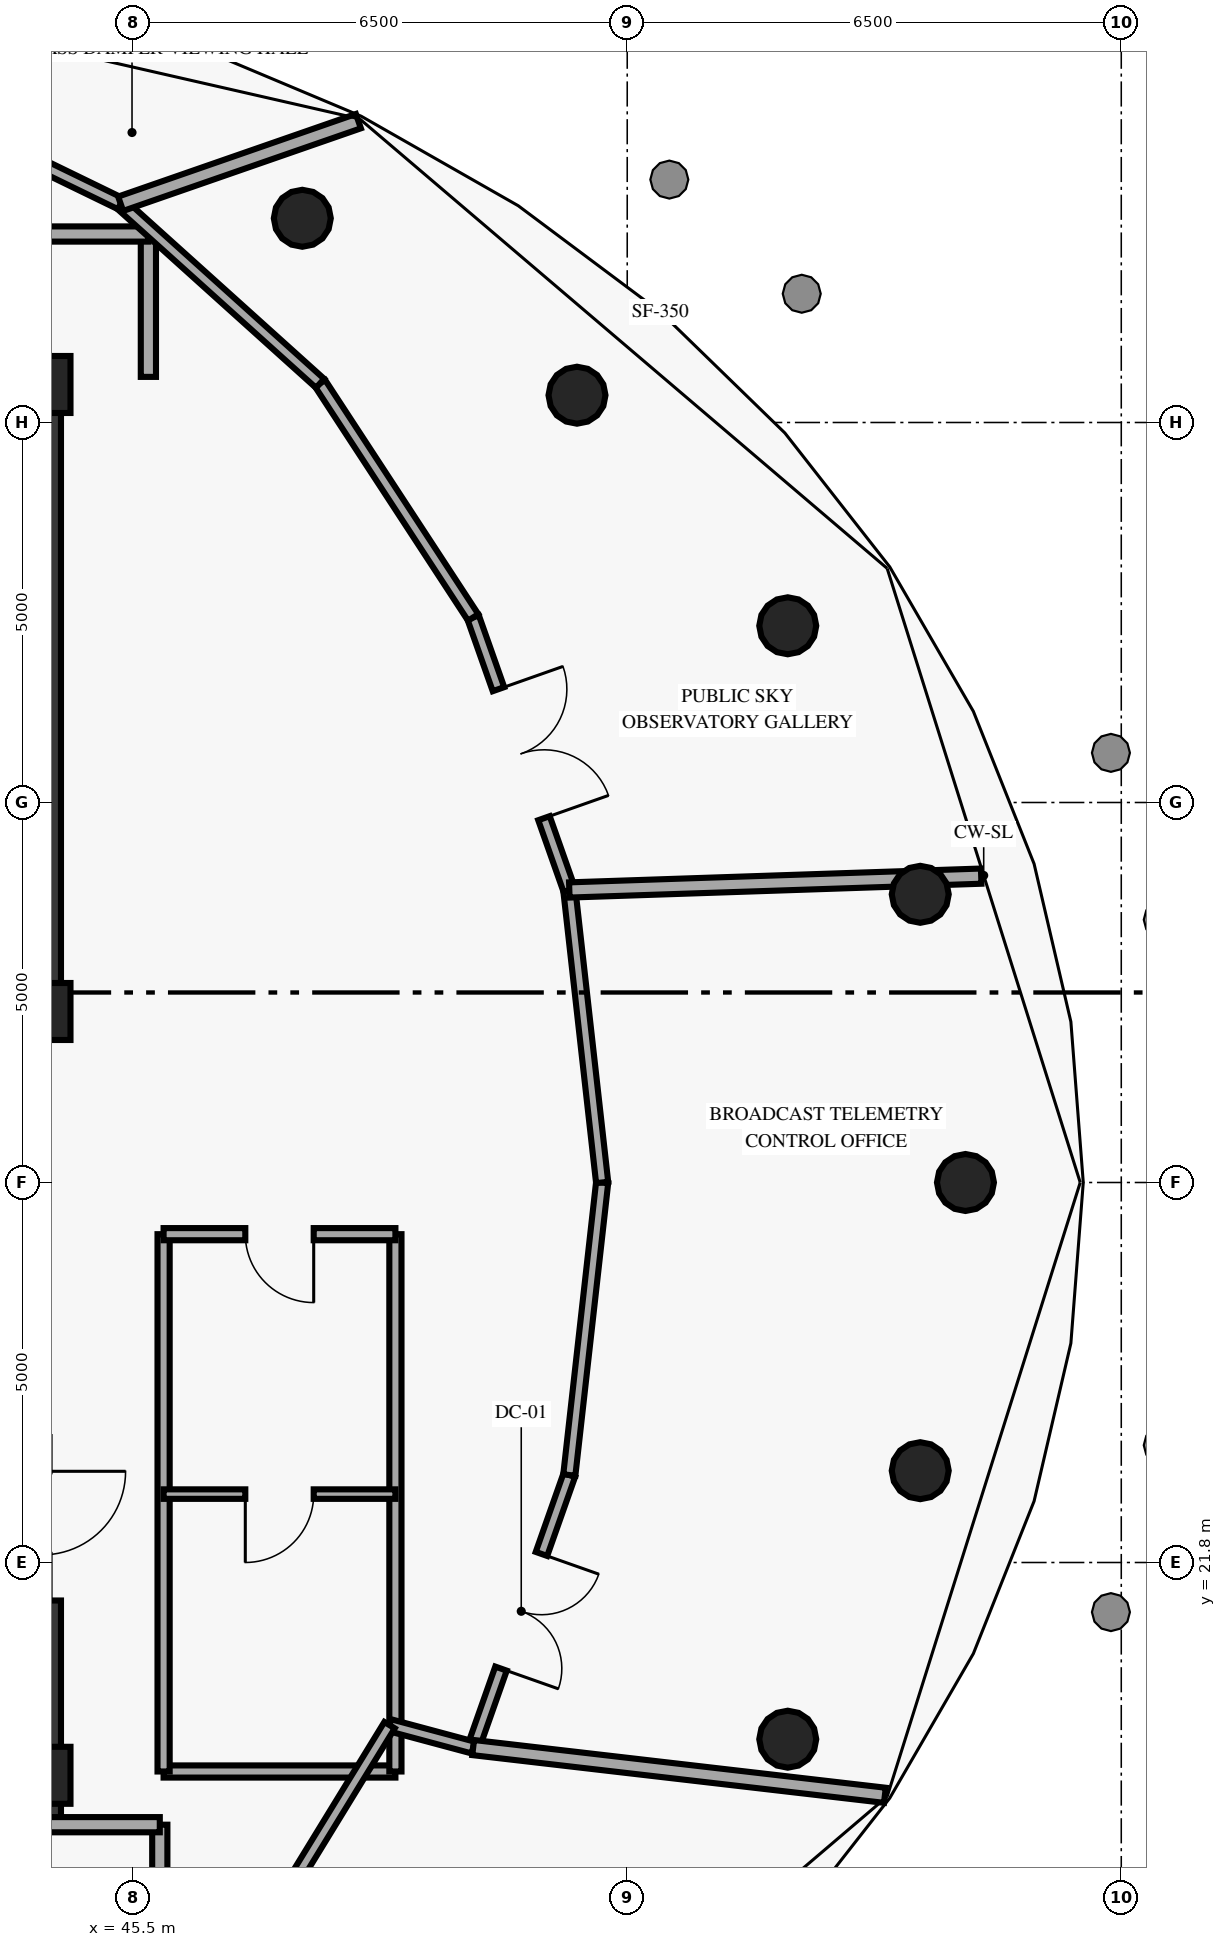
"""IFC4 building model, lengths in metres.
Left out: names, types, materials, properties, quantities, classifications, styles, units other than length and angle.
Written with IfcOpenShell. Run it as: python <this file> out.ifc"""

import sys

from ifc_helpers import new_model, si_unit, direction, frame, frame_2d, origin, origin_2d, place, context, subcontext, project, spatial, rectangle, circle, extrude, element, fill, save


model = new_model("IFC4")
c1 = context("Model", 3, precision=1e-05, world=origin(), true_north=direction((0.0, 1.0)))
c2 = subcontext(c1, "Body", "Model", "MODEL_VIEW")
j1 = project(units=[si_unit("LENGTHUNIT", "METRE"), si_unit("PLANEANGLEUNIT", "RADIAN")], contexts=[c1])
p1 = place(None, origin())
s1 = spatial("IfcSite", under=j1, at=p1, CompositionType="ELEMENT")
p2 = place(p1, origin())
s2 = spatial("IfcBuilding", under=s1, at=p2, CompositionType="ELEMENT")
p3 = place(p2, frame((0.0, 0.0, 306.8)))
s3 = spatial("IfcBuildingStorey", under=s2, at=p3, CompositionType="ELEMENT", Elevation=306.8)
for number, where, z_axis, x_axis in (
    (1, (44.3, 19.0, 0.0), (0.0, 0.0, 1.0), (1.0, 0.0, 0.0)),
    (2, (44.3, 29.05, 0.0), (0.0, 0.0, 1.0), (1.0, 0.0, 0.0)),
    (3, (44.3, 37.3, 0.0), (0.0, 0.0, 1.0), (1.0, 0.0, 0.0)),
):
    element("IfcColumn", number, at=place(p3, frame(where, z_axis=z_axis, x_axis=x_axis)), inside=s3, PredefinedType="PILASTER", context=c2, shape_type="SweptSolid", body=[
        extrude(rectangle(XDim=0.75, YDim=0.75, at=origin_2d()), origin(), (0.0, 0.0, 1.0), 6.18),
    ])
for number, where, z_axis, x_axis in (
    (4, (56.45, 26.8, 0.0), (0.0, 0.0, 1.0), (1.0, 0.0, 0.0)),
    (5, (55.855, 30.592, 0.0), (0.0, 0.0, 1.0), (1.0, 0.0, 0.0)),
    (6, (54.112, 34.125, 0.0), (0.0, 0.0, 1.0), (1.0, 0.0, 0.0)),
    (7, (51.339, 37.159, 0.0), (0.0, 0.0, 1.0), (1.0, 0.0, 0.0)),
    (8, (47.725, 39.487, 0.0), (0.0, 0.0, 1.0), (1.0, 0.0, 0.0)),
    (9, (54.112, 19.475, 0.0), (0.0, 0.0, 1.0), (1.0, 0.0, 0.0)),
    (10, (55.855, 23.008, 0.0), (0.0, 0.0, 1.0), (1.0, 0.0, 0.0)),
):
    element("IfcColumn", number, at=place(p3, frame(where, z_axis=z_axis, x_axis=x_axis)), inside=s3, PredefinedType="COLUMN", context=c2, shape_type="SweptSolid", body=[
        extrude(circle(Radius=0.375, at=origin_2d()), origin(), (0.0, 0.0, 1.0), 6.18),
    ])
p4 = place(p3, frame((44.3, 29.05, 0.0), z_axis=(0.0, 0.0, 1.0), x_axis=(0.0, 1.0, 0.0)))
e11 = element("IfcWall", 11, at=p4, inside=s3, PredefinedType="SHEAR", context=c2, shape_type="SweptSolid", body=[
    extrude(rectangle(XDim=8.35, YDim=0.5, at=frame_2d((4.175, 0.0))), origin(), (0.0, 0.0, 1.0), 6.18),
])
p5 = place(p3, frame((44.3, 18.35, 0.0), z_axis=(0.0, 0.0, 1.0), x_axis=(0.0, 1.0, 0.0)))
e12 = element("IfcWall", 12, at=p5, inside=s3, PredefinedType="SHEAR", context=c2, shape_type="SweptSolid", body=[
    extrude(rectangle(XDim=2.95, YDim=0.5, at=frame_2d((1.475, 0.0))), origin(), (0.0, 0.0, 1.0), 6.18),
])
p6 = place(p3, frame((45.7, 37.4, 0.0), z_axis=(0.0, 0.0, 1.0), x_axis=(0.0, 1.0, 0.0)))
e13 = element("IfcWall", 13, at=p6, inside=s3, PredefinedType="SOLIDWALL", context=c2, shape_type="SweptSolid", body=[
    extrude(rectangle(XDim=1.88, YDim=0.2, at=frame_2d((0.94, 0.0))), origin(), (0.0, 0.0, 1.0), 6.18),
])
p7 = place(p3, frame((45.7, 39.28, 0.0), z_axis=(0.0, 0.0, 1.0), x_axis=(-1.0, 0.0, 0.0)))
e14 = element("IfcWall", 14, at=p7, inside=s3, PredefinedType="SOLIDWALL", context=c2, shape_type="SweptSolid", body=[
    extrude(rectangle(XDim=6.6, YDim=0.2, at=frame_2d((3.3, 0.0))), origin(), (0.0, 0.0, 1.0), 6.18),
])
p8 = place(p7, frame((4.35, 0.0, 0.0)))
e15 = element("IfcOpeningElement", 15, at=p8, cuts=e14, PredefinedType="OPENING", context=c2, shape_type="SweptSolid", body=[
    extrude(rectangle(XDim=1.6, YDim=2.2, at=frame_2d((0.8, 1.1))), frame((0.0, 0.11, 0.0), z_axis=(0.0, -1.0, 0.0), x_axis=(1.0, 0.0, 0.0)), (0.0, 0.0, 1.0), 0.22),
])
p9 = place(p3, frame((45.9, 19.05, 0.0), z_axis=(0.0, 0.0, 1.0), x_axis=(1.0, 0.0, 0.0)))
e16 = element("IfcWall", 16, at=p9, inside=s3, PredefinedType="PARTITIONING", context=c2, shape_type="SweptSolid", body=[
    extrude(rectangle(XDim=3.05, YDim=0.16, at=frame_2d((1.525, 0.0))), origin(), (0.0, 0.0, 1.0), 6.18),
])
for number, where, z_axis, x_axis in (
    (17, (48.95, 19.05, 0.0), (0.0, 0.0, 1.0), (0.0, 1.0, 0.0)),
    (18, (45.9, 19.05, 0.0), (0.0, 0.0, 1.0), (0.0, 1.0, 0.0)),
):
    element("IfcWall", number, at=place(p3, frame(where, z_axis=z_axis, x_axis=x_axis)), inside=s3, PredefinedType="PARTITIONING", context=c2, shape_type="SweptSolid", body=[
        extrude(rectangle(XDim=7.07, YDim=0.16, at=frame_2d((3.535, 0.0))), origin(), (0.0, 0.0, 1.0), 6.18),
    ])
p10 = place(p3, frame((48.95, 22.7, 0.0), z_axis=(0.0, 0.0, 1.0), x_axis=(-1.0, 0.0, 0.0)))
e19 = element("IfcWall", 19, at=p10, inside=s3, PredefinedType="PARTITIONING", context=c2, shape_type="SweptSolid", body=[
    extrude(rectangle(XDim=3.05, YDim=0.125, at=frame_2d((1.525, 0.0))), origin(), (0.0, 0.0, 1.0), 6.18),
])
p11 = place(p10, frame((1.075, 0.0, 0.0)))
e20 = element("IfcOpeningElement", 20, at=p11, cuts=e19, PredefinedType="OPENING", context=c2, shape_type="SweptSolid", body=[
    extrude(rectangle(XDim=0.9, YDim=2.1, at=frame_2d((0.45, 1.05))), frame((0.0, 0.073, 0.0), z_axis=(0.0, -1.0, 0.0), x_axis=(1.0, 0.0, 0.0)), (0.0, 0.0, 1.0), 0.145),
])
p12 = place(p3, frame((48.95, 26.12, 0.0), z_axis=(0.0, 0.0, 1.0), x_axis=(-1.0, 0.0, 0.0)))
e21 = element("IfcWall", 21, at=p12, inside=s3, PredefinedType="PARTITIONING", context=c2, shape_type="SweptSolid", body=[
    extrude(rectangle(XDim=3.05, YDim=0.16, at=frame_2d((1.525, 0.0))), origin(), (0.0, 0.0, 1.0), 6.18),
])
p13 = place(p12, frame((1.075, 0.0, 0.0)))
e22 = element("IfcOpeningElement", 22, at=p13, cuts=e21, PredefinedType="OPENING", context=c2, shape_type="SweptSolid", body=[
    extrude(rectangle(XDim=0.9, YDim=2.1, at=frame_2d((0.45, 1.05))), frame((0.0, 0.09, 0.0), z_axis=(0.0, -1.0, 0.0), x_axis=(1.0, 0.0, 0.0)), (0.0, 0.0, 1.0), 0.18),
])
p14 = place(p3, frame((45.85, 16.05, 0.0), z_axis=(0.0, 0.0, 1.0), x_axis=(0.0, 1.0, 0.0)))
e23 = element("IfcWall", 23, at=p14, inside=s3, PredefinedType="SOLIDWALL", context=c2, shape_type="SweptSolid", body=[
    extrude(rectangle(XDim=2.3, YDim=0.2, at=frame_2d((1.15, 0.0))), origin(), (0.0, 0.0, 1.0), 6.18),
])
p15 = place(p3, frame((44.3, 18.35, 0.0), z_axis=(0.0, 0.0, 1.0), x_axis=(1.0, 0.0, 0.0)))
e24 = element("IfcWall", 24, at=p15, inside=s3, PredefinedType="SOLIDWALL", context=c2, shape_type="SweptSolid", body=[
    extrude(rectangle(XDim=1.55, YDim=0.2, at=frame_2d((0.775, 0.0))), origin(), (0.0, 0.0, 1.0), 6.18),
])
p16 = place(p3, frame((51.238, 22.951, 0.0), z_axis=(0.0, 0.0, 1.0), x_axis=(-0.332705930675, -0.943030627124, 0.0)))
e25 = element("IfcWall", 25, at=p16, inside=s3, PredefinedType="PARTITIONING", context=c2, shape_type="SweptSolid", body=[
    extrude(rectangle(XDim=3.802, YDim=0.16, at=frame_2d((1.901, 0.0))), origin(), (0.0, 0.0, 1.0), 6.18),
])
p17 = place(p16, frame((1.101, 0.0, 0.0)))
e26 = element("IfcOpeningElement", 26, at=p17, cuts=e25, PredefinedType="OPENING", context=c2, shape_type="SweptSolid", body=[
    extrude(rectangle(XDim=1.6, YDim=2.2, at=frame_2d((0.8, 1.1))), frame((0.0, 0.09, 0.0), z_axis=(0.0, -1.0, 0.0), x_axis=(1.0, 0.0, 0.0)), (0.0, 0.0, 1.0), 0.18),
])
p18 = place(p3, frame((51.238, 22.951, 0.0), z_axis=(0.0, 0.0, 1.0), x_axis=(0.1115037761, 0.993764010173, 0.0)))
e27 = element("IfcWall", 27, at=p18, inside=s3, PredefinedType="PARTITIONING", context=c2, shape_type="SweptSolid", body=[
    extrude(rectangle(XDim=3.873, YDim=0.16, at=frame_2d((1.937, 0.0))), origin(), (0.0, 0.0, 1.0), 6.18),
])
p19 = place(p3, frame((51.67, 26.8, 0.0), z_axis=(0.0, 0.0, 1.0), x_axis=(-0.111510761023, 0.993763226416, 0.0)))
e28 = element("IfcWall", 28, at=p19, inside=s3, PredefinedType="PARTITIONING", context=c2, shape_type="SweptSolid", body=[
    extrude(rectangle(XDim=3.873, YDim=0.16, at=frame_2d((1.937, 0.0))), origin(), (0.0, 0.0, 1.0), 6.18),
])
p20 = place(p3, frame((49.973, 34.235, 0.0), z_axis=(0.0, 0.0, 1.0), x_axis=(0.332685787644, -0.943037733444, 0.0)))
e29 = element("IfcWall", 29, at=p20, inside=s3, PredefinedType="PARTITIONING", context=c2, shape_type="SweptSolid", body=[
    extrude(rectangle(XDim=3.803, YDim=0.16, at=frame_2d((1.901, 0.0))), origin(), (0.0, 0.0, 1.0), 6.18),
])
p21 = place(p20, frame((1.001, 0.0, 0.0)))
e30 = element("IfcOpeningElement", 30, at=p21, cuts=e29, PredefinedType="OPENING", context=c2, shape_type="SweptSolid", body=[
    extrude(rectangle(XDim=1.8, YDim=2.3, at=frame_2d((0.9, 1.15))), frame((0.0, 0.09, 0.0), z_axis=(0.0, -1.0, 0.0), x_axis=(1.0, 0.0, 0.0)), (0.0, 0.0, 1.0), 0.18),
])
p22 = place(p3, frame((49.973, 34.235, 0.0), z_axis=(0.0, 0.0, 1.0), x_axis=(-0.547283325884, 0.836947406477, 0.0)))
e31 = element("IfcWall", 31, at=p22, inside=s3, PredefinedType="PARTITIONING", context=c2, shape_type="SweptSolid", body=[
    extrude(rectangle(XDim=3.68, YDim=0.16, at=frame_2d((1.84, 0.0))), origin(), (0.0, 0.0, 1.0), 6.18),
])
p23 = place(p3, frame((47.959, 37.315, 0.0), z_axis=(0.0, 0.0, 1.0), x_axis=(-0.743094720901, 0.669186248939, 0.0)))
e32 = element("IfcWall", 32, at=p23, inside=s3, PredefinedType="PARTITIONING", context=c2, shape_type="SweptSolid", body=[
    extrude(rectangle(XDim=3.531, YDim=0.16, at=frame_2d((1.766, 0.0))), origin(), (0.0, 0.0, 1.0), 6.18),
])
p24 = place(p3, frame((45.335, 39.678, 0.0), z_axis=(0.0, 0.0, 1.0), x_axis=(-0.899414545514, 0.437096642995, 0.0)))
e33 = element("IfcWall", 33, at=p24, inside=s3, PredefinedType="PARTITIONING", context=c2, shape_type="SweptSolid", body=[
    extrude(rectangle(XDim=3.398, YDim=0.16, at=frame_2d((1.699, 0.0))), origin(), (0.0, 0.0, 1.0), 6.18),
])
p25 = place(p3, frame((48.873, 19.66, 0.0), z_axis=(0.0, 0.0, 1.0), x_axis=(0.965878165217, -0.258996853181, 0.0)))
e34 = element("IfcWall", 34, at=p25, inside=s3, PredefinedType="PARTITIONING", context=c2, shape_type="SweptSolid", body=[
    extrude(rectangle(XDim=1.139, YDim=0.16, at=frame_2d((0.569, 0.0))), origin(), (0.0, 0.0, 1.0), 6.18),
])
p26 = place(p3, frame((49.973, 19.365, 0.0), z_axis=(0.0, 0.0, 1.0), x_axis=(0.993348408025, -0.115147471851, 0.0)))
e35 = element("IfcWall", 35, at=p26, inside=s3, PredefinedType="PARTITIONING", context=c2, shape_type="SweptSolid", body=[
    extrude(rectangle(XDim=5.453, YDim=0.2, at=frame_2d((2.727, 0.0))), origin(), (0.0, 0.0, 1.0), 6.18),
])
p27 = place(p3, frame((51.238, 30.649, 0.0), z_axis=(0.0, 0.0, 1.0), x_axis=(0.999435673454, 0.033590692575, 0.0)))
e36 = element("IfcWall", 36, at=p27, inside=s3, PredefinedType="PARTITIONING", context=c2, shape_type="SweptSolid", body=[
    extrude(rectangle(XDim=5.422, YDim=0.2, at=frame_2d((2.711, 0.0))), origin(), (0.0, 0.0, 1.0), 6.18),
])
p28 = place(p3, frame((45.335, 39.678, 0.0), z_axis=(0.0, 0.0, 1.0), x_axis=(0.944596217107, 0.328234651777, 0.0)))
e37 = element("IfcWall", 37, at=p28, inside=s3, PredefinedType="PARTITIONING", context=c2, shape_type="SweptSolid", body=[
    extrude(rectangle(XDim=3.311, YDim=0.2, at=frame_2d((1.656, 0.0))), origin(), (0.0, 0.0, 1.0), 6.18),
])
p29 = place(p3, frame((47.061, 16.703, 0.0), z_axis=(0.0, 0.0, 1.0), x_axis=(0.522486120877, 0.852647789823, 0.0)))
e38 = element("IfcWall", 38, at=p29, inside=s3, PredefinedType="PARTITIONING", context=c2, shape_type="SweptSolid", body=[
    extrude(rectangle(XDim=3.468, YDim=0.16, at=frame_2d((1.734, 0.0))), origin(), (0.0, 0.0, 1.0), 6.18),
])
p30 = place(p11, origin())
e39 = element("IfcDoor", 39, at=p30, inside=s3, OperationType="SINGLE_SWING_RIGHT", PredefinedType="DOOR", context=c2, shape_type="SweptSolid", body=[
    extrude(rectangle(XDim=0.9, YDim=2.1, at=frame_2d((0.45, 1.05))), frame((0.0, 0.025, 0.0), z_axis=(0.0, -1.0, 0.0), x_axis=(1.0, 0.0, 0.0)), (0.0, 0.0, 1.0), 0.05),
])
fill(e20, e39)
p31 = place(p13, origin())
e40 = element("IfcDoor", 40, at=p31, inside=s3, OperationType="SINGLE_SWING_LEFT", PredefinedType="DOOR", context=c2, shape_type="SweptSolid", body=[
    extrude(rectangle(XDim=0.9, YDim=2.1, at=frame_2d((0.45, 1.05))), frame((0.0, 0.025, 0.0), z_axis=(0.0, -1.0, 0.0), x_axis=(1.0, 0.0, 0.0)), (0.0, 0.0, 1.0), 0.05),
])
fill(e22, e40)
p32 = place(p17, origin())
e41 = element("IfcDoor", 41, at=p32, inside=s3, OperationType="DOUBLE_DOOR_SINGLE_SWING", PredefinedType="DOOR", context=c2, shape_type="SweptSolid", body=[
    extrude(rectangle(XDim=1.6, YDim=2.2, at=frame_2d((0.8, 1.1))), frame((0.0, 0.025, 0.0), z_axis=(0.0, -1.0, 0.0), x_axis=(1.0, 0.0, 0.0)), (0.0, 0.0, 1.0), 0.05),
])
fill(e26, e41)
p33 = place(p21, origin())
e42 = element("IfcDoor", 42, at=p33, inside=s3, OperationType="DOUBLE_DOOR_SINGLE_SWING", PredefinedType="DOOR", context=c2, shape_type="SweptSolid", body=[
    extrude(rectangle(XDim=1.8, YDim=2.3, at=frame_2d((0.9, 1.15))), frame((0.0, 0.025, 0.0), z_axis=(0.0, -1.0, 0.0), x_axis=(1.0, 0.0, 0.0)), (0.0, 0.0, 1.0), 0.05),
])
fill(e30, e42)
save(model, sys.argv[1])
